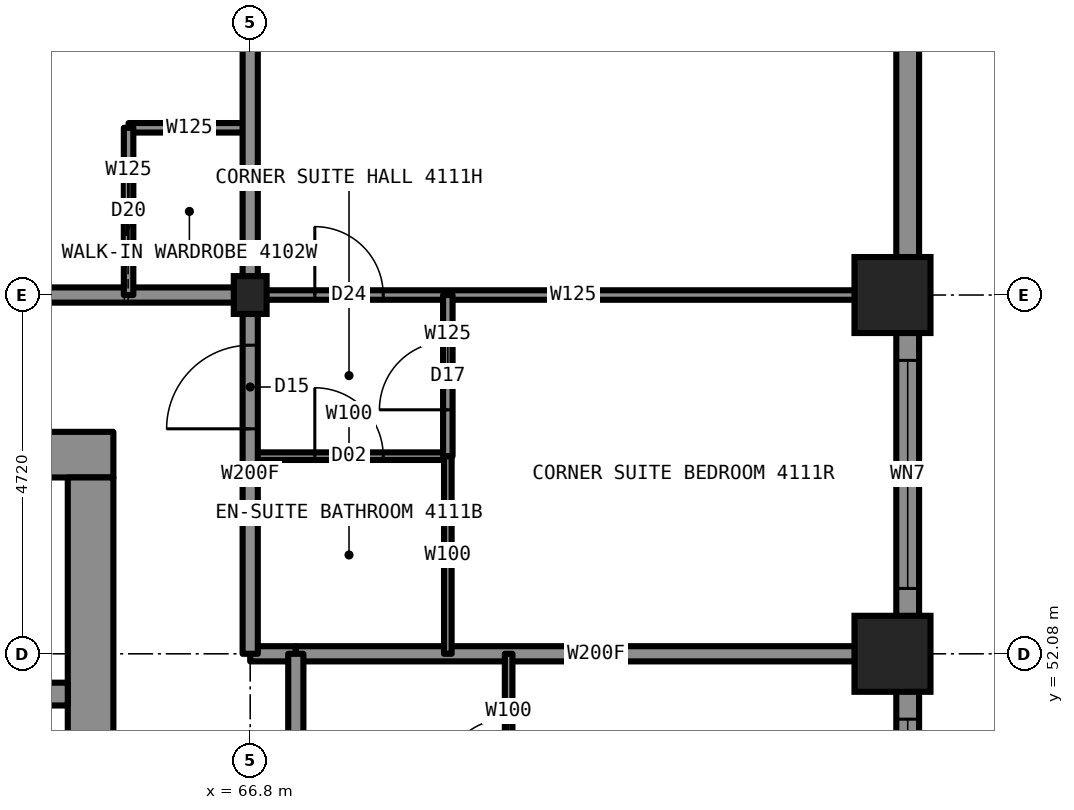
"""IFC4 building model, lengths in metres.
Left out: names, types, materials, properties, quantities, classifications, styles, units other than length and angle.
Written with IfcOpenShell. Run it as: python <this file> out.ifc"""

import sys

from ifc_helpers import new_model, si_unit, direction, frame, frame_2d, origin, origin_2d, place, context, subcontext, project, spatial, rectangle, i_section, extrude, element, fill, save


model = new_model("IFC4")
c1 = context("Model", 3, precision=1e-05, world=origin(), true_north=direction((0.0, 1.0)))
c2 = subcontext(c1, "Body", "Model", "MODEL_VIEW")
j1 = project(units=[si_unit("LENGTHUNIT", "METRE"), si_unit("PLANEANGLEUNIT", "RADIAN")], contexts=[c1])
p1 = place(None, origin())
s1 = spatial("IfcSite", under=j1, at=p1, CompositionType="ELEMENT")
p2 = place(p1, origin())
s2 = spatial("IfcBuilding", under=s1, at=p2, CompositionType="ELEMENT")
p3 = place(p2, frame((0.0, 0.0, 145.9)))
s3 = spatial("IfcBuildingStorey", under=s2, at=p3, CompositionType="ELEMENT", Elevation=145.9)
for number, where, z_axis, x_axis in (
    (1, (75.25, 52.08, 0.0), (0.0, 0.0, 1.0), (1.0, 0.0, 0.0)),
    (2, (75.25, 56.8, 0.0), (0.0, 0.0, 1.0), (1.0, 0.0, 0.0)),
):
    element("IfcColumn", number, at=place(p3, frame(where, z_axis=z_axis, x_axis=x_axis)), inside=s3, PredefinedType="COLUMN", context=c2, shape_type="SweptSolid", body=[
        extrude(i_section(OverallWidth=0.422, OverallDepth=0.465, WebThickness=0.045, FlangeThickness=0.073, at=origin_2d()), origin(), (0.0, 0.0, 1.0), 3.5),
    ])
p4 = place(p3, frame((66.8, 56.8, 0.0), z_axis=(0.0, 0.0, 1.0), x_axis=(1.0, 0.0, 0.0)))
e3 = element("IfcColumn", 3, at=p4, inside=s3, PredefinedType="COLUMN", context=c2, shape_type="SweptSolid", body=[
    extrude(i_section(OverallWidth=0.432, OverallDepth=0.498, WebThickness=0.056, FlangeThickness=0.089, at=origin_2d()), origin(), (0.0, 0.0, 1.0), 3.5),
])
p5 = place(p3, frame((45.0, 54.7, 0.0), z_axis=(0.0, 0.0, 1.0), x_axis=(1.0, 0.0, 0.0)))
e4 = element("IfcWall", 4, at=p5, inside=s3, PredefinedType="SHEAR", context=c2, shape_type="SweptSolid", body=[
    extrude(rectangle(XDim=20.0, YDim=0.6, at=frame_2d((10.0, 0.0))), origin(), (0.0, 0.0, 1.0), 3.5),
])
p6 = place(p3, frame((64.7, 35.6, 0.0), z_axis=(0.0, 0.0, 1.0), x_axis=(0.0, 1.0, 0.0)))
e5 = element("IfcWall", 5, at=p6, inside=s3, PredefinedType="SHEAR", context=c2, shape_type="SweptSolid", body=[
    extrude(rectangle(XDim=18.8, YDim=0.6, at=frame_2d((9.4, 0.0))), origin(), (0.0, 0.0, 1.0), 3.5),
])
p7 = place(p6, frame((13.4, 0.0, 0.0)))
e6 = element("IfcOpeningElement", 6, at=p7, cuts=e5, PredefinedType="OPENING", context=c2, shape_type="SweptSolid", body=[
    extrude(rectangle(XDim=1.8, YDim=2.2, at=frame_2d((0.9, 1.1))), frame((0.0, 0.31, 0.0), z_axis=(0.0, -1.0, 0.0), x_axis=(1.0, 0.0, 0.0)), (0.0, 0.0, 1.0), 0.62),
])
p8 = place(p6, frame((3.6, 0.0, 0.0)))
e7 = element("IfcOpeningElement", 7, at=p8, cuts=e5, PredefinedType="OPENING", context=c2, shape_type="SweptSolid", body=[
    extrude(rectangle(XDim=1.8, YDim=2.2, at=frame_2d((0.9, 1.1))), frame((0.0, 0.31, 0.0), z_axis=(0.0, -1.0, 0.0), x_axis=(1.0, 0.0, 0.0)), (0.0, 0.0, 1.0), 0.62),
])
p9 = place(p3, frame((45.6, 51.55, 0.0), z_axis=(0.0, 0.0, 1.0), x_axis=(1.0, 0.0, 0.0)))
e8 = element("IfcWall", 8, at=p9, inside=s3, PredefinedType="SHEAR", context=c2, shape_type="SweptSolid", body=[
    extrude(rectangle(XDim=18.8, YDim=0.3, at=frame_2d((9.4, 0.0))), origin(), (0.0, 0.0, 1.0), 3.5),
])
p10 = place(p9, frame((0.7, 0.0, 0.0)))
e9 = element("IfcOpeningElement", 9, at=p10, cuts=e8, PredefinedType="OPENING", context=c2, shape_type="SweptSolid", body=[
    extrude(rectangle(XDim=1.1, YDim=2.2, at=frame_2d((0.55, 1.1))), frame((0.0, 0.16, 0.0), z_axis=(0.0, -1.0, 0.0), x_axis=(1.0, 0.0, 0.0)), (0.0, 0.0, 1.0), 0.32),
])
p11 = place(p9, frame((3.4, 0.0, 0.0)))
e10 = element("IfcOpeningElement", 10, at=p11, cuts=e8, PredefinedType="OPENING", context=c2, shape_type="SweptSolid", body=[
    extrude(rectangle(XDim=1.1, YDim=2.2, at=frame_2d((0.55, 1.1))), frame((0.0, 0.16, 0.0), z_axis=(0.0, -1.0, 0.0), x_axis=(1.0, 0.0, 0.0)), (0.0, 0.0, 1.0), 0.32),
])
p12 = place(p9, frame((6.1, 0.0, 0.0)))
e11 = element("IfcOpeningElement", 11, at=p12, cuts=e8, PredefinedType="OPENING", context=c2, shape_type="SweptSolid", body=[
    extrude(rectangle(XDim=1.1, YDim=2.2, at=frame_2d((0.55, 1.1))), frame((0.0, 0.16, 0.0), z_axis=(0.0, -1.0, 0.0), x_axis=(1.0, 0.0, 0.0)), (0.0, 0.0, 1.0), 0.32),
])
p13 = place(p9, frame((8.8, 0.0, 0.0)))
e12 = element("IfcOpeningElement", 12, at=p13, cuts=e8, PredefinedType="OPENING", context=c2, shape_type="SweptSolid", body=[
    extrude(rectangle(XDim=1.1, YDim=2.2, at=frame_2d((0.55, 1.1))), frame((0.0, 0.16, 0.0), z_axis=(0.0, -1.0, 0.0), x_axis=(1.0, 0.0, 0.0)), (0.0, 0.0, 1.0), 0.32),
])
p14 = place(p9, frame((11.6, 0.0, 0.0)))
e13 = element("IfcOpeningElement", 13, at=p14, cuts=e8, PredefinedType="OPENING", context=c2, shape_type="SweptSolid", body=[
    extrude(rectangle(XDim=1.1, YDim=2.2, at=frame_2d((0.55, 1.1))), frame((0.0, 0.16, 0.0), z_axis=(0.0, -1.0, 0.0), x_axis=(1.0, 0.0, 0.0)), (0.0, 0.0, 1.0), 0.32),
])
p15 = place(p9, frame((14.3, 0.0, 0.0)))
e14 = element("IfcOpeningElement", 14, at=p15, cuts=e8, PredefinedType="OPENING", context=c2, shape_type="SweptSolid", body=[
    extrude(rectangle(XDim=1.1, YDim=2.2, at=frame_2d((0.55, 1.1))), frame((0.0, 0.16, 0.0), z_axis=(0.0, -1.0, 0.0), x_axis=(1.0, 0.0, 0.0)), (0.0, 0.0, 1.0), 0.32),
])
p16 = place(p3, frame((43.2, 56.8, 0.0), z_axis=(0.0, 0.0, 1.0), x_axis=(1.0, 0.0, 0.0)))
e15 = element("IfcWall", 15, at=p16, inside=s3, PredefinedType="PARTITIONING", context=c2, shape_type="SweptSolid", body=[
    extrude(rectangle(XDim=23.6, YDim=0.2, at=frame_2d((11.8, 0.0))), origin(), (0.0, 0.0, 1.0), 3.33),
])
p17 = place(p16, frame((1.85, 0.0, 0.0)))
e16 = element("IfcOpeningElement", 16, at=p17, cuts=e15, PredefinedType="OPENING", context=c2, shape_type="SweptSolid", body=[
    extrude(rectangle(XDim=1.1, YDim=2.2, at=frame_2d((0.55, 1.1))), frame((0.0, 0.11, 0.0), z_axis=(0.0, -1.0, 0.0), x_axis=(1.0, 0.0, 0.0)), (0.0, 0.0, 1.0), 0.22),
])
p18 = place(p16, frame((17.16, 0.0, 0.0)))
e17 = element("IfcOpeningElement", 17, at=p18, cuts=e15, PredefinedType="OPENING", context=c2, shape_type="SweptSolid", body=[
    extrude(rectangle(XDim=1.0, YDim=2.2, at=frame_2d((0.5, 1.1))), frame((0.0, 0.11, 0.0), z_axis=(0.0, -1.0, 0.0), x_axis=(1.0, 0.0, 0.0)), (0.0, 0.0, 1.0), 0.22),
])
p19 = place(p3, frame((66.8, 56.8, 0.0), z_axis=(0.0, 0.0, 1.0), x_axis=(1.0, 0.0, 0.0)))
e18 = element("IfcWall", 18, at=p19, inside=s3, PredefinedType="PARTITIONING", context=c2, shape_type="SweptSolid", body=[
    extrude(rectangle(XDim=8.5, YDim=0.125, at=frame_2d((4.25, 0.0))), origin(), (0.0, 0.0, 1.0), 2.573),
])
p20 = place(p19, frame((0.85, 0.0, 0.0)))
e19 = element("IfcOpeningElement", 19, at=p20, cuts=e18, PredefinedType="OPENING", context=c2, shape_type="SweptSolid", body=[
    extrude(rectangle(XDim=0.9, YDim=2.2, at=frame_2d((0.45, 1.1))), frame((0.0, 0.073, 0.0), z_axis=(0.0, -1.0, 0.0), x_axis=(1.0, 0.0, 0.0)), (0.0, 0.0, 1.0), 0.145),
])
p21 = place(p3, frame((65.2, 59.0, 0.0), z_axis=(0.0, 0.0, 1.0), x_axis=(1.0, 0.0, 0.0)))
e20 = element("IfcWall", 20, at=p21, inside=s3, PredefinedType="PARTITIONING", context=c2, shape_type="SweptSolid", body=[
    extrude(rectangle(XDim=1.6, YDim=0.125, at=frame_2d((0.8, 0.0))), origin(), (0.0, 0.0, 1.0), 3.33),
])
p22 = place(p3, frame((66.8, 52.08, 0.0), z_axis=(0.0, 0.0, 1.0), x_axis=(1.0, 0.0, 0.0)))
e21 = element("IfcWall", 21, at=p22, inside=s3, PredefinedType="PARTITIONING", context=c2, shape_type="SweptSolid", body=[
    extrude(rectangle(XDim=2.6, YDim=0.2, at=frame_2d((1.3, 0.0))), origin(), (0.0, 0.0, 1.0), 2.573),
])
p23 = place(p3, frame((69.6, 52.08, 0.0), z_axis=(0.0, 0.0, 1.0), x_axis=(1.0, 0.0, 0.0)))
e22 = element("IfcWall", 22, at=p23, inside=s3, PredefinedType="PARTITIONING", context=c2, shape_type="SweptSolid", body=[
    extrude(rectangle(XDim=5.7, YDim=0.2, at=frame_2d((2.85, 0.0))), origin(), (0.0, 0.0, 1.0), 2.573),
])
p24 = place(p3, frame((66.8, 54.68, 0.0), z_axis=(0.0, 0.0, 1.0), x_axis=(1.0, 0.0, 0.0)))
e23 = element("IfcWall", 23, at=p24, inside=s3, PredefinedType="PARTITIONING", context=c2, shape_type="SweptSolid", body=[
    extrude(rectangle(XDim=2.6, YDim=0.1, at=frame_2d((1.3, 0.0))), origin(), (0.0, 0.0, 1.0), 3.33),
])
p25 = place(p24, frame((0.85, 0.0, 0.0)))
e24 = element("IfcOpeningElement", 24, at=p25, cuts=e23, PredefinedType="OPENING", context=c2, shape_type="SweptSolid", body=[
    extrude(rectangle(XDim=0.9, YDim=2.1, at=frame_2d((0.45, 1.05))), frame((0.0, 0.06, 0.0), z_axis=(0.0, -1.0, 0.0), x_axis=(1.0, 0.0, 0.0)), (0.0, 0.0, 1.0), 0.12),
])
p26 = place(p3, frame((65.2, 56.8, 0.0), z_axis=(0.0, 0.0, 1.0), x_axis=(0.0, 1.0, 0.0)))
e25 = element("IfcWall", 25, at=p26, inside=s3, PredefinedType="PARTITIONING", context=c2, shape_type="SweptSolid", body=[
    extrude(rectangle(XDim=2.2, YDim=0.125, at=frame_2d((1.1, 0.0))), origin(), (0.0, 0.0, 1.0), 3.33),
])
p27 = place(p26, frame((0.7, 0.0, 0.0)))
e26 = element("IfcOpeningElement", 26, at=p27, cuts=e25, PredefinedType="OPENING", context=c2, shape_type="SweptSolid", body=[
    extrude(rectangle(XDim=0.8, YDim=2.1, at=frame_2d((0.4, 1.05))), frame((0.0, 0.073, 0.0), z_axis=(0.0, -1.0, 0.0), x_axis=(1.0, 0.0, 0.0)), (0.0, 0.0, 1.0), 0.145),
])
p28 = place(p3, frame((66.8, 33.2, 0.0), z_axis=(0.0, 0.0, 1.0), x_axis=(0.0, 1.0, 0.0)))
e27 = element("IfcWall", 27, at=p28, inside=s3, PredefinedType="PARTITIONING", context=c2, shape_type="SweptSolid", body=[
    extrude(rectangle(XDim=23.6, YDim=0.2, at=frame_2d((11.8, 0.0))), origin(), (0.0, 0.0, 1.0), 3.33),
])
p29 = place(p28, frame((7.87, 0.0, 0.0)))
e28 = element("IfcOpeningElement", 28, at=p29, cuts=e27, PredefinedType="OPENING", context=c2, shape_type="SweptSolid", body=[
    extrude(rectangle(XDim=1.0, YDim=2.2, at=frame_2d((0.5, 1.1))), frame((0.0, 0.11, 0.0), z_axis=(0.0, -1.0, 0.0), x_axis=(1.0, 0.0, 0.0)), (0.0, 0.0, 1.0), 0.22),
])
p30 = place(p28, frame((11.7, 0.0, 0.0)))
e29 = element("IfcOpeningElement", 29, at=p30, cuts=e27, PredefinedType="OPENING", context=c2, shape_type="SweptSolid", body=[
    extrude(rectangle(XDim=1.0, YDim=2.2, at=frame_2d((0.5, 1.1))), frame((0.0, 0.11, 0.0), z_axis=(0.0, -1.0, 0.0), x_axis=(1.0, 0.0, 0.0)), (0.0, 0.0, 1.0), 0.22),
])
p31 = place(p28, frame((14.56, 0.0, 0.0)))
e30 = element("IfcOpeningElement", 30, at=p31, cuts=e27, PredefinedType="OPENING", context=c2, shape_type="SweptSolid", body=[
    extrude(rectangle(XDim=1.0, YDim=2.2, at=frame_2d((0.5, 1.1))), frame((0.0, 0.11, 0.0), z_axis=(0.0, -1.0, 0.0), x_axis=(1.0, 0.0, 0.0)), (0.0, 0.0, 1.0), 0.22),
])
p32 = place(p28, frame((21.84, 0.0, 0.0)))
e31 = element("IfcOpeningElement", 31, at=p32, cuts=e27, PredefinedType="OPENING", context=c2, shape_type="SweptSolid", body=[
    extrude(rectangle(XDim=1.1, YDim=2.2, at=frame_2d((0.55, 1.1))), frame((0.0, 0.11, 0.0), z_axis=(0.0, -1.0, 0.0), x_axis=(1.0, 0.0, 0.0)), (0.0, 0.0, 1.0), 0.22),
])
p33 = place(p28, frame((0.66, 0.0, 0.0)))
e32 = element("IfcOpeningElement", 32, at=p33, cuts=e27, PredefinedType="OPENING", context=c2, shape_type="SweptSolid", body=[
    extrude(rectangle(XDim=1.1, YDim=2.2, at=frame_2d((0.55, 1.1))), frame((0.0, 0.11, 0.0), z_axis=(0.0, -1.0, 0.0), x_axis=(1.0, 0.0, 0.0)), (0.0, 0.0, 1.0), 0.22),
])
p34 = place(p3, frame((66.8, 56.8, 0.0), z_axis=(0.0, 0.0, 1.0), x_axis=(0.0, 1.0, 0.0)))
e33 = element("IfcWall", 33, at=p34, inside=s3, PredefinedType="PARTITIONING", context=c2, shape_type="SweptSolid", body=[
    extrude(rectangle(XDim=8.5, YDim=0.2, at=frame_2d((4.25, 0.0))), origin(), (0.0, 0.0, 1.0), 2.573),
])
p35 = place(p3, frame((69.4, 52.08, 0.0), z_axis=(0.0, 0.0, 1.0), x_axis=(0.0, 1.0, 0.0)))
e34 = element("IfcWall", 34, at=p35, inside=s3, PredefinedType="PARTITIONING", context=c2, shape_type="SweptSolid", body=[
    extrude(rectangle(XDim=2.6, YDim=0.1, at=frame_2d((1.3, 0.0))), origin(), (0.0, 0.0, 1.0), 3.33),
])
p36 = place(p3, frame((69.4, 54.68, 0.0), z_axis=(0.0, 0.0, 1.0), x_axis=(0.0, 1.0, 0.0)))
e35 = element("IfcWall", 35, at=p36, inside=s3, PredefinedType="PARTITIONING", context=c2, shape_type="SweptSolid", body=[
    extrude(rectangle(XDim=2.12, YDim=0.125, at=frame_2d((1.06, 0.0))), origin(), (0.0, 0.0, 1.0), 3.33),
])
p37 = place(p36, frame((0.61, 0.0, 0.0)))
e36 = element("IfcOpeningElement", 36, at=p37, cuts=e35, PredefinedType="OPENING", context=c2, shape_type="SweptSolid", body=[
    extrude(rectangle(XDim=0.9, YDim=2.2, at=frame_2d((0.45, 1.1))), frame((0.0, 0.073, 0.0), z_axis=(0.0, -1.0, 0.0), x_axis=(1.0, 0.0, 0.0)), (0.0, 0.0, 1.0), 0.145),
])
p38 = place(p3, frame((69.6, 49.48, 0.0), z_axis=(0.0, 0.0, 1.0), x_axis=(0.0, 1.0, 0.0)))
e37 = element("IfcWall", 37, at=p38, inside=s3, PredefinedType="PARTITIONING", context=c2, shape_type="SweptSolid", body=[
    extrude(rectangle(XDim=2.6, YDim=0.1, at=frame_2d((1.3, 0.0))), origin(), (0.0, 0.0, 1.0), 3.33),
])
p39 = place(p38, frame((0.85, 0.0, 0.0)))
e38 = element("IfcOpeningElement", 38, at=p39, cuts=e37, PredefinedType="OPENING", context=c2, shape_type="SweptSolid", body=[
    extrude(rectangle(XDim=0.9, YDim=2.1, at=frame_2d((0.45, 1.05))), frame((0.0, 0.06, 0.0), z_axis=(0.0, -1.0, 0.0), x_axis=(1.0, 0.0, 0.0)), (0.0, 0.0, 1.0), 0.12),
])
p40 = place(p3, frame((75.45, 29.9, 0.0), z_axis=(0.0, 0.0, 1.0), x_axis=(0.0, 1.0, 0.0)))
e39 = element("IfcWall", 39, at=p40, inside=s3, PredefinedType="SOLIDWALL", context=c2, shape_type="SweptSolid", body=[
    extrude(rectangle(XDim=30.2, YDim=0.3, at=frame_2d((15.1, 0.0))), origin(), (0.0, 0.0, 1.0), 2.83),
])
p41 = place(p40, frame((1.3, 0.0, 0.8)))
e40 = element("IfcOpeningElement", 40, at=p41, cuts=e39, PredefinedType="OPENING", context=c2, shape_type="SweptSolid", body=[
    extrude(rectangle(XDim=1.1, YDim=1.7, at=frame_2d((0.55, 0.85))), frame((0.0, 0.16, 0.0), z_axis=(0.0, -1.0, 0.0), x_axis=(1.0, 0.0, 0.0)), (0.0, 0.0, 1.0), 0.32),
])
p42 = place(p40, frame((4.16, 0.0, 0.5)))
e41 = element("IfcOpeningElement", 41, at=p42, cuts=e39, PredefinedType="OPENING", context=c2, shape_type="SweptSolid", body=[
    extrude(rectangle(XDim=3.0, YDim=2.0, at=frame_2d((1.5, 1.0))), frame((0.0, 0.16, 0.0), z_axis=(0.0, -1.0, 0.0), x_axis=(1.0, 0.0, 0.0)), (0.0, 0.0, 1.0), 0.32),
])
p43 = place(p40, frame((8.88, 0.0, 0.5)))
e42 = element("IfcOpeningElement", 42, at=p43, cuts=e39, PredefinedType="OPENING", context=c2, shape_type="SweptSolid", body=[
    extrude(rectangle(XDim=3.0, YDim=2.0, at=frame_2d((1.5, 1.0))), frame((0.0, 0.16, 0.0), z_axis=(0.0, -1.0, 0.0), x_axis=(1.0, 0.0, 0.0)), (0.0, 0.0, 1.0), 0.32),
])
p44 = place(p40, frame((13.6, 0.0, 0.5)))
e43 = element("IfcOpeningElement", 43, at=p44, cuts=e39, PredefinedType="OPENING", context=c2, shape_type="SweptSolid", body=[
    extrude(rectangle(XDim=3.0, YDim=2.0, at=frame_2d((1.5, 1.0))), frame((0.0, 0.16, 0.0), z_axis=(0.0, -1.0, 0.0), x_axis=(1.0, 0.0, 0.0)), (0.0, 0.0, 1.0), 0.32),
])
p45 = place(p40, frame((18.32, 0.0, 0.5)))
e44 = element("IfcOpeningElement", 44, at=p45, cuts=e39, PredefinedType="OPENING", context=c2, shape_type="SweptSolid", body=[
    extrude(rectangle(XDim=3.0, YDim=2.0, at=frame_2d((1.5, 1.0))), frame((0.0, 0.16, 0.0), z_axis=(0.0, -1.0, 0.0), x_axis=(1.0, 0.0, 0.0)), (0.0, 0.0, 1.0), 0.32),
])
p46 = place(p40, frame((23.04, 0.0, 0.5)))
e45 = element("IfcOpeningElement", 45, at=p46, cuts=e39, PredefinedType="OPENING", context=c2, shape_type="SweptSolid", body=[
    extrude(rectangle(XDim=3.0, YDim=2.0, at=frame_2d((1.5, 1.0))), frame((0.0, 0.16, 0.0), z_axis=(0.0, -1.0, 0.0), x_axis=(1.0, 0.0, 0.0)), (0.0, 0.0, 1.0), 0.32),
])
p47 = place(p40, frame((27.75, 0.0, 0.8)))
e46 = element("IfcOpeningElement", 46, at=p47, cuts=e39, PredefinedType="OPENING", context=c2, shape_type="SweptSolid", body=[
    extrude(rectangle(XDim=1.1, YDim=1.7, at=frame_2d((0.55, 0.85))), frame((0.0, 0.16, 0.0), z_axis=(0.0, -1.0, 0.0), x_axis=(1.0, 0.0, 0.0)), (0.0, 0.0, 1.0), 0.32),
])
p48 = place(p27, origin())
e47 = element("IfcDoor", 47, at=p48, inside=s3, OperationType="SLIDING_TO_LEFT", PredefinedType="DOOR", context=c2, shape_type="SweptSolid", body=[
    extrude(rectangle(XDim=0.8, YDim=2.1, at=frame_2d((0.4, 1.05))), frame((0.0, 0.025, 0.0), z_axis=(0.0, -1.0, 0.0), x_axis=(1.0, 0.0, 0.0)), (0.0, 0.0, 1.0), 0.05),
])
fill(e26, e47)
p49 = place(p39, origin())
e48 = element("IfcDoor", 48, at=p49, inside=s3, OperationType="SINGLE_SWING_RIGHT", PredefinedType="DOOR", context=c2, shape_type="SweptSolid", body=[
    extrude(rectangle(XDim=0.9, YDim=2.1, at=frame_2d((0.45, 1.05))), frame((0.0, 0.025, 0.0), z_axis=(0.0, -1.0, 0.0), x_axis=(1.0, 0.0, 0.0)), (0.0, 0.0, 1.0), 0.05),
])
fill(e38, e48)
p50 = place(p20, origin())
e49 = element("IfcDoor", 49, at=p50, inside=s3, OperationType="SINGLE_SWING_LEFT", PredefinedType="DOOR", context=c2, shape_type="SweptSolid", body=[
    extrude(rectangle(XDim=0.9, YDim=2.2, at=frame_2d((0.45, 1.1))), frame((0.0, 0.025, 0.0), z_axis=(0.0, -1.0, 0.0), x_axis=(1.0, 0.0, 0.0)), (0.0, 0.0, 1.0), 0.05),
])
fill(e19, e49)
p51 = place(p25, origin())
e50 = element("IfcDoor", 50, at=p51, inside=s3, OperationType="SINGLE_SWING_RIGHT", PredefinedType="DOOR", context=c2, shape_type="SweptSolid", body=[
    extrude(rectangle(XDim=0.9, YDim=2.1, at=frame_2d((0.45, 1.05))), frame((0.0, 0.025, 0.0), z_axis=(0.0, -1.0, 0.0), x_axis=(1.0, 0.0, 0.0)), (0.0, 0.0, 1.0), 0.05),
])
fill(e24, e50)
p52 = place(p32, origin())
e51 = element("IfcDoor", 51, at=p52, inside=s3, OperationType="SINGLE_SWING_LEFT", PredefinedType="DOOR", context=c2, shape_type="SweptSolid", body=[
    extrude(rectangle(XDim=1.1, YDim=2.2, at=frame_2d((0.55, 1.1))), frame((0.0, 0.025, 0.0), z_axis=(0.0, -1.0, 0.0), x_axis=(1.0, 0.0, 0.0)), (0.0, 0.0, 1.0), 0.05),
])
fill(e31, e51)
p53 = place(p37, origin())
e52 = element("IfcDoor", 52, at=p53, inside=s3, OperationType="SINGLE_SWING_LEFT", PredefinedType="DOOR", context=c2, shape_type="SweptSolid", body=[
    extrude(rectangle(XDim=0.9, YDim=2.2, at=frame_2d((0.45, 1.1))), frame((0.0, 0.025, 0.0), z_axis=(0.0, -1.0, 0.0), x_axis=(1.0, 0.0, 0.0)), (0.0, 0.0, 1.0), 0.05),
])
fill(e36, e52)
p54 = place(p45, origin())
e53 = element("IfcWindow", 53, at=p54, inside=s3, PartitioningType="SINGLE_PANEL", PredefinedType="WINDOW", context=c2, shape_type="SweptSolid", body=[
    extrude(rectangle(XDim=3.0, YDim=2.0, at=frame_2d((1.5, 1.0))), frame((0.0, 0.03, 0.0), z_axis=(0.0, -1.0, 0.0), x_axis=(1.0, 0.0, 0.0)), (0.0, 0.0, 1.0), 0.06),
])
fill(e44, e53)
p55 = place(p46, origin())
e54 = element("IfcWindow", 54, at=p55, inside=s3, PartitioningType="SINGLE_PANEL", PredefinedType="WINDOW", context=c2, shape_type="SweptSolid", body=[
    extrude(rectangle(XDim=3.0, YDim=2.0, at=frame_2d((1.5, 1.0))), frame((0.0, 0.03, 0.0), z_axis=(0.0, -1.0, 0.0), x_axis=(1.0, 0.0, 0.0)), (0.0, 0.0, 1.0), 0.06),
])
fill(e45, e54)
p56 = place(p47, origin())
e55 = element("IfcWindow", 55, at=p56, inside=s3, PartitioningType="SINGLE_PANEL", PredefinedType="WINDOW", context=c2, shape_type="SweptSolid", body=[
    extrude(rectangle(XDim=1.1, YDim=1.7, at=frame_2d((0.55, 0.85))), frame((0.0, 0.03, 0.0), z_axis=(0.0, -1.0, 0.0), x_axis=(1.0, 0.0, 0.0)), (0.0, 0.0, 1.0), 0.06),
])
fill(e46, e55)
save(model, sys.argv[1])
